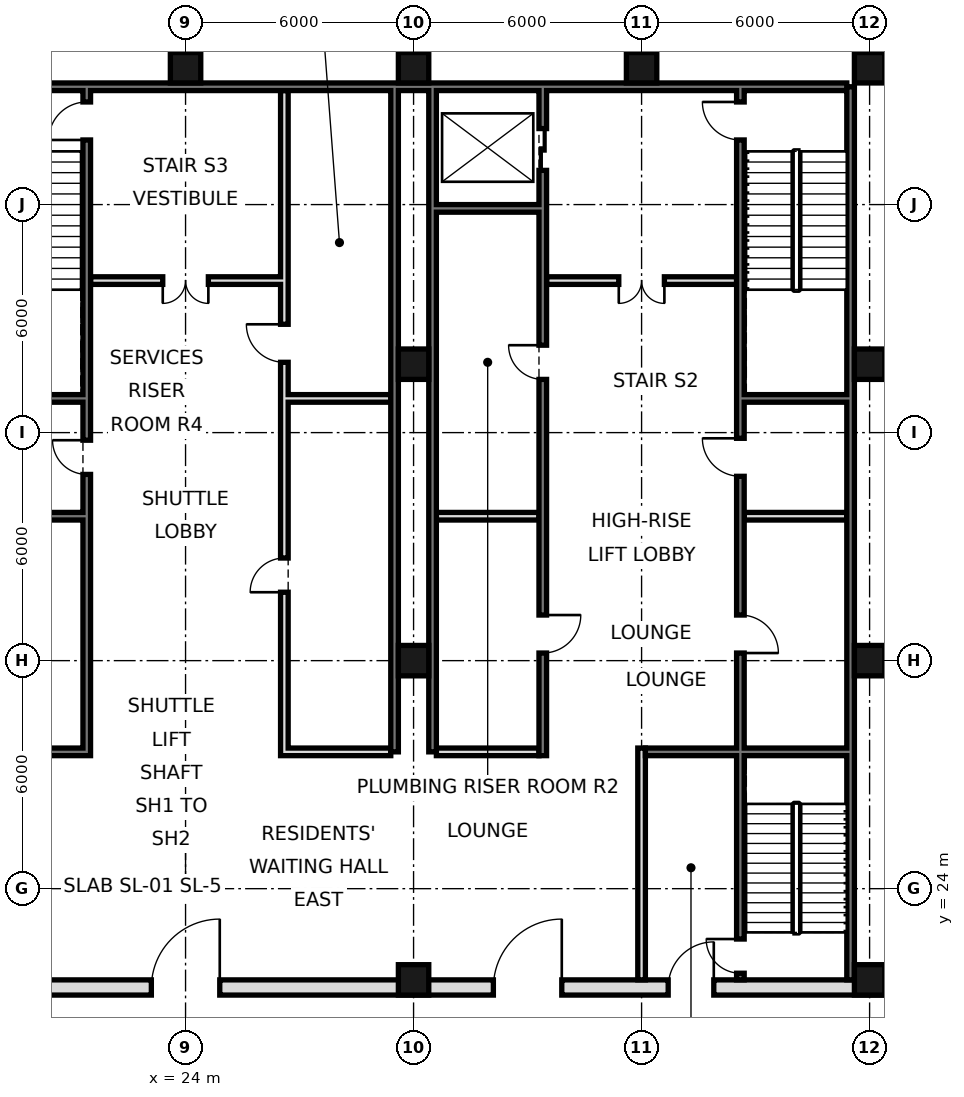
"""IFC4 building model, lengths in metres.
Left out: names, types, materials, properties, quantities, classifications, styles, units other than length and angle.
Written with IfcOpenShell. Run it as: python <this file> out.ifc"""

import sys

from ifc_helpers import new_model, si_unit, direction, frame, frame_2d, origin, origin_2d, place, context, subcontext, project, spatial, rectangle, hollow_rectangle, extrude, element, fill, save


model = new_model("IFC4")
c1 = context("Model", 3, precision=1e-05, world=origin(), true_north=direction((0.0, 1.0)))
c2 = subcontext(c1, "Body", "Model", "MODEL_VIEW")
j1 = project(units=[si_unit("LENGTHUNIT", "METRE"), si_unit("PLANEANGLEUNIT", "RADIAN")], contexts=[c1])
p1 = place(None, origin())
s1 = spatial("IfcSite", under=j1, at=p1, CompositionType="ELEMENT")
p2 = place(p1, origin())
s2 = spatial("IfcBuilding", under=s1, at=p2, CompositionType="ELEMENT")
p3 = place(p2, frame((0.0, 0.0, 25.2)))
s3 = spatial("IfcBuildingStorey", under=s2, at=p3, CompositionType="ELEMENT", Elevation=25.2)
for number, where, z_axis, x_axis in (
    (1, (24.0, 45.6, 0.0), (0.0, 0.0, 1.0), (1.0, 0.0, 0.0)),
    (2, (30.0, 21.6, 0.0), (0.0, 0.0, 1.0), (1.0, 0.0, 0.0)),
    (3, (30.0, 30.0, 0.0), (0.0, 0.0, 1.0), (1.0, 0.0, 0.0)),
    (4, (30.0, 37.8, 0.0), (0.0, 0.0, 1.0), (1.0, 0.0, 0.0)),
    (5, (30.0, 45.6, 0.0), (0.0, 0.0, 1.0), (1.0, 0.0, 0.0)),
    (6, (36.0, 45.6, 0.0), (0.0, 0.0, 1.0), (1.0, 0.0, 0.0)),
    (7, (42.0, 21.6, 0.0), (0.0, 0.0, 1.0), (1.0, 0.0, 0.0)),
    (8, (42.0, 30.0, 0.0), (0.0, 0.0, 1.0), (1.0, 0.0, 0.0)),
    (9, (42.0, 37.8, 0.0), (0.0, 0.0, 1.0), (1.0, 0.0, 0.0)),
    (10, (42.0, 45.6, 0.0), (0.0, 0.0, 1.0), (1.0, 0.0, 0.0)),
):
    element("IfcColumn", number, at=place(p3, frame(where, z_axis=z_axis, x_axis=x_axis)), inside=s3, PredefinedType="COLUMN", context=c2, shape_type="SweptSolid", body=[
        extrude(hollow_rectangle(XDim=0.8, YDim=0.8, WallThickness=0.07, at=origin_2d()), origin(), (0.0, 0.0, 1.0), 4.8),
    ])
p4 = place(p3, frame((41.5, 21.6, 0.0), z_axis=(0.0, 0.0, 1.0), x_axis=(0.0, 1.0, 0.0)))
e11 = element("IfcWall", 11, at=p4, inside=s3, PredefinedType="SOLIDWALL", context=c2, shape_type="SweptSolid", body=[
    extrude(rectangle(XDim=23.5, YDim=0.2, at=frame_2d((11.75, 0.0))), origin(), (0.0, 0.0, 1.0), 4.4),
])
p5 = place(p3, frame((6.6, 45.1, 0.0), z_axis=(0.0, 0.0, 1.0), x_axis=(1.0, 0.0, 0.0)))
e12 = element("IfcWall", 12, at=p5, inside=s3, PredefinedType="SOLIDWALL", context=c2, shape_type="SweptSolid", body=[
    extrude(rectangle(XDim=34.8, YDim=0.2, at=frame_2d((17.4, 0.0))), origin(), (0.0, 0.0, 1.0), 4.4),
])
for number, where, z_axis, x_axis in (
    (13, (29.5, 27.6, 0.0), (0.0, 0.0, 1.0), (0.0, 1.0, 0.0)),
    (14, (30.5, 27.6, 0.0), (0.0, 0.0, 1.0), (0.0, 1.0, 0.0)),
):
    element("IfcWall", number, at=place(p3, frame(where, z_axis=z_axis, x_axis=x_axis)), inside=s3, PredefinedType="SOLIDWALL", context=c2, shape_type="SweptSolid", body=[
        extrude(rectangle(XDim=17.5, YDim=0.2, at=frame_2d((8.75, 0.0))), origin(), (0.0, 0.0, 1.0), 4.4),
    ])
p6 = place(p3, frame((5.6, 21.4, 0.0), z_axis=(0.0, 0.0, 1.0), x_axis=(1.0, 0.0, 0.0)))
e15 = element("IfcWall", 15, at=p6, inside=s3, PredefinedType="SOLIDWALL", context=c2, shape_type="SweptSolid", body=[
    extrude(rectangle(XDim=36.8, YDim=0.4, at=frame_2d((18.4, 0.0))), origin(), (0.0, 0.0, 1.0), 4.4),
])
p7 = place(p6, frame((8.5, 0.0, 0.0)))
e16 = element("IfcOpeningElement", 16, at=p7, cuts=e15, PredefinedType="OPENING", context=c2, shape_type="SweptSolid", body=[
    extrude(rectangle(XDim=1.8, YDim=2.1, at=frame_2d((0.9, 1.05))), frame((0.0, 0.21, 0.0), z_axis=(0.0, -1.0, 0.0), x_axis=(1.0, 0.0, 0.0)), (0.0, 0.0, 1.0), 0.42),
])
p8 = place(p6, frame((17.5, 0.0, 0.0)))
e17 = element("IfcOpeningElement", 17, at=p8, cuts=e15, PredefinedType="OPENING", context=c2, shape_type="SweptSolid", body=[
    extrude(rectangle(XDim=1.8, YDim=2.1, at=frame_2d((0.9, 1.05))), frame((0.0, 0.21, 0.0), z_axis=(0.0, -1.0, 0.0), x_axis=(1.0, 0.0, 0.0)), (0.0, 0.0, 1.0), 0.42),
])
p9 = place(p6, frame((26.5, 0.0, 0.0)))
e18 = element("IfcOpeningElement", 18, at=p9, cuts=e15, PredefinedType="OPENING", context=c2, shape_type="SweptSolid", body=[
    extrude(rectangle(XDim=1.8, YDim=2.1, at=frame_2d((0.9, 1.05))), frame((0.0, 0.21, 0.0), z_axis=(0.0, -1.0, 0.0), x_axis=(1.0, 0.0, 0.0)), (0.0, 0.0, 1.0), 0.42),
])
p10 = place(p6, frame((4.5, 0.0, 0.0)))
e19 = element("IfcOpeningElement", 19, at=p10, cuts=e15, PredefinedType="OPENING", context=c2, shape_type="SweptSolid", body=[
    extrude(rectangle(XDim=1.2, YDim=2.1, at=frame_2d((0.6, 1.05))), frame((0.0, 0.21, 0.0), z_axis=(0.0, -1.0, 0.0), x_axis=(1.0, 0.0, 0.0)), (0.0, 0.0, 1.0), 0.42),
])
p11 = place(p6, frame((31.1, 0.0, 0.0)))
e20 = element("IfcOpeningElement", 20, at=p11, cuts=e15, PredefinedType="OPENING", context=c2, shape_type="SweptSolid", body=[
    extrude(rectangle(XDim=1.2, YDim=2.1, at=frame_2d((0.6, 1.05))), frame((0.0, 0.21, 0.0), z_axis=(0.0, -1.0, 0.0), x_axis=(1.0, 0.0, 0.0)), (0.0, 0.0, 1.0), 0.42),
])
p12 = place(p3, frame((21.4, 27.5, 0.0), z_axis=(0.0, 0.0, 1.0), x_axis=(0.0, 1.0, 0.0)))
e21 = element("IfcWall", 21, at=p12, inside=s3, PredefinedType="SOLIDWALL", context=c2, shape_type="SweptSolid", body=[
    extrude(rectangle(XDim=17.5, YDim=0.2, at=frame_2d((8.75, 0.0))), origin(), (0.0, 0.0, 1.0), 4.4),
])
p13 = place(p12, frame((16.2, 0.0, 0.0)))
e22 = element("IfcOpeningElement", 22, at=p13, cuts=e21, PredefinedType="OPENING", context=c2, shape_type="SweptSolid", body=[
    extrude(rectangle(XDim=1.0, YDim=2.1, at=frame_2d((0.5, 1.05))), frame((0.0, 0.11, 0.0), z_axis=(0.0, -1.0, 0.0), x_axis=(1.0, 0.0, 0.0)), (0.0, 0.0, 1.0), 0.22),
])
p14 = place(p12, frame((7.4, 0.0, 0.0)))
e23 = element("IfcOpeningElement", 23, at=p14, cuts=e21, PredefinedType="OPENING", context=c2, shape_type="SweptSolid", body=[
    extrude(rectangle(XDim=0.9, YDim=2.1, at=frame_2d((0.45, 1.05))), frame((0.0, 0.11, 0.0), z_axis=(0.0, -1.0, 0.0), x_axis=(1.0, 0.0, 0.0)), (0.0, 0.0, 1.0), 0.22),
])
p15 = place(p3, frame((26.6, 27.5, 0.0), z_axis=(0.0, 0.0, 1.0), x_axis=(0.0, 1.0, 0.0)))
e24 = element("IfcWall", 24, at=p15, inside=s3, PredefinedType="SOLIDWALL", context=c2, shape_type="SweptSolid", body=[
    extrude(rectangle(XDim=17.5, YDim=0.2, at=frame_2d((8.75, 0.0))), origin(), (0.0, 0.0, 1.0), 4.4),
])
p16 = place(p15, frame((4.3, 0.0, 0.0)))
e25 = element("IfcOpeningElement", 25, at=p16, cuts=e24, PredefinedType="OPENING", context=c2, shape_type="SweptSolid", body=[
    extrude(rectangle(XDim=0.9, YDim=2.1, at=frame_2d((0.45, 1.05))), frame((0.0, 0.11, 0.0), z_axis=(0.0, -1.0, 0.0), x_axis=(1.0, 0.0, 0.0)), (0.0, 0.0, 1.0), 0.22),
])
p17 = place(p15, frame((10.35, 0.0, 0.0)))
e26 = element("IfcOpeningElement", 26, at=p17, cuts=e24, PredefinedType="OPENING", context=c2, shape_type="SweptSolid", body=[
    extrude(rectangle(XDim=1.0, YDim=2.1, at=frame_2d((0.5, 1.05))), frame((0.0, 0.11, 0.0), z_axis=(0.0, -1.0, 0.0), x_axis=(1.0, 0.0, 0.0)), (0.0, 0.0, 1.0), 0.22),
])
p18 = place(p3, frame((33.4, 27.5, 0.0), z_axis=(0.0, 0.0, 1.0), x_axis=(0.0, 1.0, 0.0)))
e27 = element("IfcWall", 27, at=p18, inside=s3, PredefinedType="SOLIDWALL", context=c2, shape_type="SweptSolid", body=[
    extrude(rectangle(XDim=17.5, YDim=0.2, at=frame_2d((8.75, 0.0))), origin(), (0.0, 0.0, 1.0), 4.4),
])
p19 = place(p18, frame((15.4, 0.0, 0.0)))
e28 = element("IfcOpeningElement", 28, at=p19, cuts=e27, PredefinedType="OPENING", context=c2, shape_type="SweptSolid", body=[
    extrude(rectangle(XDim=1.1, YDim=2.1, at=frame_2d((0.55, 1.05))), frame((0.0, 0.11, 0.0), z_axis=(0.0, -1.0, 0.0), x_axis=(1.0, 0.0, 0.0)), (0.0, 0.0, 1.0), 0.22),
])
p20 = place(p18, frame((2.7, 0.0, 0.0)))
e29 = element("IfcOpeningElement", 29, at=p20, cuts=e27, PredefinedType="OPENING", context=c2, shape_type="SweptSolid", body=[
    extrude(rectangle(XDim=1.0, YDim=2.1, at=frame_2d((0.5, 1.05))), frame((0.0, 0.11, 0.0), z_axis=(0.0, -1.0, 0.0), x_axis=(1.0, 0.0, 0.0)), (0.0, 0.0, 1.0), 0.22),
])
p21 = place(p18, frame((9.9, 0.0, 0.0)))
e30 = element("IfcOpeningElement", 30, at=p21, cuts=e27, PredefinedType="OPENING", context=c2, shape_type="SweptSolid", body=[
    extrude(rectangle(XDim=0.9, YDim=2.1, at=frame_2d((0.45, 1.05))), frame((0.0, 0.11, 0.0), z_axis=(0.0, -1.0, 0.0), x_axis=(1.0, 0.0, 0.0)), (0.0, 0.0, 1.0), 0.22),
])
p22 = place(p3, frame((36.0, 21.6, 0.0), z_axis=(0.0, 0.0, 1.0), x_axis=(0.0, 1.0, 0.0)))
e31 = element("IfcWall", 31, at=p22, inside=s3, PredefinedType="PARTITIONING", context=c2, shape_type="SweptSolid", body=[
    extrude(rectangle(XDim=6.1, YDim=0.2, at=frame_2d((3.05, 0.0))), origin(), (0.0, 0.0, 1.0), 4.4),
])
p23 = place(p3, frame((38.6, 21.6, 0.0), z_axis=(0.0, 0.0, 1.0), x_axis=(0.0, 1.0, 0.0)))
e32 = element("IfcWall", 32, at=p23, inside=s3, PredefinedType="SOLIDWALL", context=c2, shape_type="SweptSolid", body=[
    extrude(rectangle(XDim=23.4, YDim=0.2, at=frame_2d((11.7, 0.0))), origin(), (0.0, 0.0, 1.0), 4.4),
])
p24 = place(p23, frame((8.6, 0.0, 0.0)))
e33 = element("IfcOpeningElement", 33, at=p24, cuts=e32, PredefinedType="OPENING", context=c2, shape_type="SweptSolid", body=[
    extrude(rectangle(XDim=1.0, YDim=2.1, at=frame_2d((0.5, 1.05))), frame((0.0, 0.11, 0.0), z_axis=(0.0, -1.0, 0.0), x_axis=(1.0, 0.0, 0.0)), (0.0, 0.0, 1.0), 0.22),
])
p25 = place(p23, frame((13.25, 0.0, 0.0)))
e34 = element("IfcOpeningElement", 34, at=p25, cuts=e32, PredefinedType="OPENING", context=c2, shape_type="SweptSolid", body=[
    extrude(rectangle(XDim=1.0, YDim=2.1, at=frame_2d((0.5, 1.05))), frame((0.0, 0.11, 0.0), z_axis=(0.0, -1.0, 0.0), x_axis=(1.0, 0.0, 0.0)), (0.0, 0.0, 1.0), 0.22),
])
p26 = place(p23, frame((22.1, 0.0, 0.0)))
e35 = element("IfcOpeningElement", 35, at=p26, cuts=e32, PredefinedType="OPENING", context=c2, shape_type="SweptSolid", body=[
    extrude(rectangle(XDim=1.0, YDim=2.1, at=frame_2d((0.5, 1.05))), frame((0.0, 0.11, 0.0), z_axis=(0.0, -1.0, 0.0), x_axis=(1.0, 0.0, 0.0)), (0.0, 0.0, 1.0), 0.22),
])
p27 = place(p23, frame((0.175, 0.0, 0.0)))
e36 = element("IfcOpeningElement", 36, at=p27, cuts=e32, PredefinedType="OPENING", context=c2, shape_type="SweptSolid", body=[
    extrude(rectangle(XDim=0.9, YDim=2.1, at=frame_2d((0.45, 1.05))), frame((0.0, 0.11, 0.0), z_axis=(0.0, -1.0, 0.0), x_axis=(1.0, 0.0, 0.0)), (0.0, 0.0, 1.0), 0.22),
])
for number, where, z_axis, x_axis in (
    (37, (18.6, 27.6, 0.0), (0.0, 0.0, 1.0), (1.0, 0.0, 0.0)),
    (38, (26.7, 27.6, 0.0), (0.0, 0.0, 1.0), (1.0, 0.0, 0.0)),
):
    element("IfcWall", number, at=place(p3, frame(where, z_axis=z_axis, x_axis=x_axis)), inside=s3, PredefinedType="SOLIDWALL", context=c2, shape_type="SweptSolid", body=[
        extrude(rectangle(XDim=2.7, YDim=0.2, at=frame_2d((1.35, 0.0))), origin(), (0.0, 0.0, 1.0), 4.4),
    ])
p28 = place(p3, frame((30.6, 27.6, 0.0), z_axis=(0.0, 0.0, 1.0), x_axis=(1.0, 0.0, 0.0)))
e39 = element("IfcWall", 39, at=p28, inside=s3, PredefinedType="PARTITIONING", context=c2, shape_type="SweptSolid", body=[
    extrude(rectangle(XDim=2.7, YDim=0.2, at=frame_2d((1.35, 0.0))), origin(), (0.0, 0.0, 1.0), 4.4),
])
p29 = place(p3, frame((36.1, 27.6, 0.0), z_axis=(0.0, 0.0, 1.0), x_axis=(1.0, 0.0, 0.0)))
e40 = element("IfcWall", 40, at=p29, inside=s3, PredefinedType="SOLIDWALL", context=c2, shape_type="SweptSolid", body=[
    extrude(rectangle(XDim=5.3, YDim=0.2, at=frame_2d((2.65, 0.0))), origin(), (0.0, 0.0, 1.0), 4.4),
])
for number, where, z_axis, x_axis in (
    (41, (18.6, 33.8, 0.0), (0.0, 0.0, 1.0), (1.0, 0.0, 0.0)),
    (42, (30.6, 33.8, 0.0), (0.0, 0.0, 1.0), (1.0, 0.0, 0.0)),
):
    element("IfcWall", number, at=place(p3, frame(where, z_axis=z_axis, x_axis=x_axis)), inside=s3, PredefinedType="SOLIDWALL", context=c2, shape_type="SweptSolid", body=[
        extrude(rectangle(XDim=2.7, YDim=0.2, at=frame_2d((1.35, 0.0))), origin(), (0.0, 0.0, 1.0), 4.4),
    ])
p30 = place(p3, frame((38.7, 33.8, 0.0), z_axis=(0.0, 0.0, 1.0), x_axis=(1.0, 0.0, 0.0)))
e43 = element("IfcWall", 43, at=p30, inside=s3, PredefinedType="PARTITIONING", context=c2, shape_type="SweptSolid", body=[
    extrude(rectangle(XDim=2.7, YDim=0.2, at=frame_2d((1.35, 0.0))), origin(), (0.0, 0.0, 1.0), 4.4),
])
for number, where, z_axis, x_axis in (
    (44, (18.6, 36.9, 0.0), (0.0, 0.0, 1.0), (1.0, 0.0, 0.0)),
    (45, (26.7, 36.9, 0.0), (0.0, 0.0, 1.0), (1.0, 0.0, 0.0)),
    (46, (38.7, 36.9, 0.0), (0.0, 0.0, 1.0), (1.0, 0.0, 0.0)),
):
    element("IfcWall", number, at=place(p3, frame(where, z_axis=z_axis, x_axis=x_axis)), inside=s3, PredefinedType="SOLIDWALL", context=c2, shape_type="SweptSolid", body=[
        extrude(rectangle(XDim=2.7, YDim=0.2, at=frame_2d((1.35, 0.0))), origin(), (0.0, 0.0, 1.0), 4.4),
    ])
p31 = place(p3, frame((21.5, 40.0, 0.0), z_axis=(0.0, 0.0, 1.0), x_axis=(1.0, 0.0, 0.0)))
e47 = element("IfcWall", 47, at=p31, inside=s3, PredefinedType="PARTITIONING", context=c2, shape_type="SweptSolid", body=[
    extrude(rectangle(XDim=5.0, YDim=0.2, at=frame_2d((2.5, 0.0))), origin(), (0.0, 0.0, 1.0), 4.4),
])
p32 = place(p31, frame((1.9, 0.0, 0.0)))
e48 = element("IfcOpeningElement", 48, at=p32, cuts=e47, PredefinedType="OPENING", context=c2, shape_type="SweptSolid", body=[
    extrude(rectangle(XDim=1.2, YDim=2.1, at=frame_2d((0.6, 1.05))), frame((0.0, 0.11, 0.0), z_axis=(0.0, -1.0, 0.0), x_axis=(1.0, 0.0, 0.0)), (0.0, 0.0, 1.0), 0.22),
])
p33 = place(p3, frame((33.5, 40.0, 0.0), z_axis=(0.0, 0.0, 1.0), x_axis=(1.0, 0.0, 0.0)))
e49 = element("IfcWall", 49, at=p33, inside=s3, PredefinedType="PARTITIONING", context=c2, shape_type="SweptSolid", body=[
    extrude(rectangle(XDim=5.0, YDim=0.2, at=frame_2d((2.5, 0.0))), origin(), (0.0, 0.0, 1.0), 4.4),
])
p34 = place(p33, frame((1.9, 0.0, 0.0)))
e50 = element("IfcOpeningElement", 50, at=p34, cuts=e49, PredefinedType="OPENING", context=c2, shape_type="SweptSolid", body=[
    extrude(rectangle(XDim=1.2, YDim=2.1, at=frame_2d((0.6, 1.05))), frame((0.0, 0.11, 0.0), z_axis=(0.0, -1.0, 0.0), x_axis=(1.0, 0.0, 0.0)), (0.0, 0.0, 1.0), 0.22),
])
p35 = place(p3, frame((30.6, 41.9, 0.0), z_axis=(0.0, 0.0, 1.0), x_axis=(1.0, 0.0, 0.0)))
e51 = element("IfcWall", 51, at=p35, inside=s3, PredefinedType="SOLIDWALL", context=c2, shape_type="SweptSolid", body=[
    extrude(rectangle(XDim=2.7, YDim=0.2, at=frame_2d((1.35, 0.0))), origin(), (0.0, 0.0, 1.0), 4.4),
])
p36 = place(p8, frame((1.8, 0.0, 0.0), z_axis=(0.0, 0.0, 1.0), x_axis=(-1.0, 0.0, 0.0)))
e52 = element("IfcDoor", 52, at=p36, inside=s3, OperationType="SINGLE_SWING_LEFT", PredefinedType="DOOR", context=c2, shape_type="SweptSolid", body=[
    extrude(rectangle(XDim=1.8, YDim=2.1, at=frame_2d((0.9, 1.05))), frame((0.0, 0.025, 0.0), z_axis=(0.0, -1.0, 0.0), x_axis=(1.0, 0.0, 0.0)), (0.0, 0.0, 1.0), 0.05),
])
fill(e17, e52)
p37 = place(p9, frame((1.8, 0.0, 0.0), z_axis=(0.0, 0.0, 1.0), x_axis=(-1.0, 0.0, 0.0)))
e53 = element("IfcDoor", 53, at=p37, inside=s3, OperationType="SINGLE_SWING_LEFT", PredefinedType="DOOR", context=c2, shape_type="SweptSolid", body=[
    extrude(rectangle(XDim=1.8, YDim=2.1, at=frame_2d((0.9, 1.05))), frame((0.0, 0.025, 0.0), z_axis=(0.0, -1.0, 0.0), x_axis=(1.0, 0.0, 0.0)), (0.0, 0.0, 1.0), 0.05),
])
fill(e18, e53)
p38 = place(p11, frame((1.2, 0.0, 0.0), z_axis=(0.0, 0.0, 1.0), x_axis=(-1.0, 0.0, 0.0)))
e54 = element("IfcDoor", 54, at=p38, inside=s3, OperationType="SINGLE_SWING_LEFT", PredefinedType="DOOR", context=c2, shape_type="SweptSolid", body=[
    extrude(rectangle(XDim=1.2, YDim=2.1, at=frame_2d((0.6, 1.05))), frame((0.0, 0.025, 0.0), z_axis=(0.0, -1.0, 0.0), x_axis=(1.0, 0.0, 0.0)), (0.0, 0.0, 1.0), 0.05),
])
fill(e20, e54)
p39 = place(p32, frame((1.2, 0.0, 0.0), z_axis=(0.0, 0.0, 1.0), x_axis=(-1.0, 0.0, 0.0)))
e55 = element("IfcDoor", 55, at=p39, inside=s3, OperationType="DOUBLE_DOOR_SINGLE_SWING", PredefinedType="DOOR", context=c2, shape_type="SweptSolid", body=[
    extrude(rectangle(XDim=1.2, YDim=2.1, at=frame_2d((0.6, 1.05))), frame((0.0, 0.025, 0.0), z_axis=(0.0, -1.0, 0.0), x_axis=(1.0, 0.0, 0.0)), (0.0, 0.0, 1.0), 0.05),
])
fill(e48, e55)
p40 = place(p34, frame((1.2, 0.0, 0.0), z_axis=(0.0, 0.0, 1.0), x_axis=(-1.0, 0.0, 0.0)))
e56 = element("IfcDoor", 56, at=p40, inside=s3, OperationType="DOUBLE_DOOR_SINGLE_SWING", PredefinedType="DOOR", context=c2, shape_type="SweptSolid", body=[
    extrude(rectangle(XDim=1.2, YDim=2.1, at=frame_2d((0.6, 1.05))), frame((0.0, 0.025, 0.0), z_axis=(0.0, -1.0, 0.0), x_axis=(1.0, 0.0, 0.0)), (0.0, 0.0, 1.0), 0.05),
])
fill(e50, e56)
p41 = place(p19, origin())
e57 = element("IfcDoor", 57, at=p41, inside=s3, OperationType="DOUBLE_DOOR_SLIDING", PredefinedType="DOOR", context=c2, shape_type="SweptSolid", body=[
    extrude(rectangle(XDim=1.1, YDim=2.1, at=frame_2d((0.55, 1.05))), frame((0.0, 0.025, 0.0), z_axis=(0.0, -1.0, 0.0), x_axis=(1.0, 0.0, 0.0)), (0.0, 0.0, 1.0), 0.05),
])
fill(e28, e57)
p42 = place(p24, frame((1.0, 0.0, 0.0), z_axis=(0.0, 0.0, 1.0), x_axis=(-1.0, 0.0, 0.0)))
e58 = element("IfcDoor", 58, at=p42, inside=s3, OperationType="SINGLE_SWING_RIGHT", PredefinedType="DOOR", context=c2, shape_type="SweptSolid", body=[
    extrude(rectangle(XDim=1.0, YDim=2.1, at=frame_2d((0.5, 1.05))), frame((0.0, 0.025, 0.0), z_axis=(0.0, -1.0, 0.0), x_axis=(1.0, 0.0, 0.0)), (0.0, 0.0, 1.0), 0.05),
])
fill(e33, e58)
p43 = place(p25, frame((1.0, 0.0, 0.0), z_axis=(0.0, 0.0, 1.0), x_axis=(-1.0, 0.0, 0.0)))
e59 = element("IfcDoor", 59, at=p43, inside=s3, OperationType="SINGLE_SWING_LEFT", PredefinedType="DOOR", context=c2, shape_type="SweptSolid", body=[
    extrude(rectangle(XDim=1.0, YDim=2.1, at=frame_2d((0.5, 1.05))), frame((0.0, 0.025, 0.0), z_axis=(0.0, -1.0, 0.0), x_axis=(1.0, 0.0, 0.0)), (0.0, 0.0, 1.0), 0.05),
])
fill(e34, e59)
p44 = place(p20, origin())
e60 = element("IfcDoor", 60, at=p44, inside=s3, OperationType="SINGLE_SWING_RIGHT", PredefinedType="DOOR", context=c2, shape_type="SweptSolid", body=[
    extrude(rectangle(XDim=1.0, YDim=2.1, at=frame_2d((0.5, 1.05))), frame((0.0, 0.025, 0.0), z_axis=(0.0, -1.0, 0.0), x_axis=(1.0, 0.0, 0.0)), (0.0, 0.0, 1.0), 0.05),
])
fill(e29, e60)
p45 = place(p26, frame((1.0, 0.0, 0.0), z_axis=(0.0, 0.0, 1.0), x_axis=(-1.0, 0.0, 0.0)))
e61 = element("IfcDoor", 61, at=p45, inside=s3, OperationType="SINGLE_SWING_LEFT", PredefinedType="DOOR", context=c2, shape_type="SweptSolid", body=[
    extrude(rectangle(XDim=1.0, YDim=2.1, at=frame_2d((0.5, 1.05))), frame((0.0, 0.025, 0.0), z_axis=(0.0, -1.0, 0.0), x_axis=(1.0, 0.0, 0.0)), (0.0, 0.0, 1.0), 0.05),
])
fill(e35, e61)
p46 = place(p13, origin())
e62 = element("IfcDoor", 62, at=p46, inside=s3, OperationType="SINGLE_SWING_LEFT", PredefinedType="DOOR", context=c2, shape_type="SweptSolid", body=[
    extrude(rectangle(XDim=1.0, YDim=2.1, at=frame_2d((0.5, 1.05))), frame((0.0, 0.025, 0.0), z_axis=(0.0, -1.0, 0.0), x_axis=(1.0, 0.0, 0.0)), (0.0, 0.0, 1.0), 0.05),
])
fill(e22, e62)
p47 = place(p27, frame((0.9, 0.0, 0.0), z_axis=(0.0, 0.0, 1.0), x_axis=(-1.0, 0.0, 0.0)))
e63 = element("IfcDoor", 63, at=p47, inside=s3, OperationType="SINGLE_SWING_LEFT", PredefinedType="DOOR", context=c2, shape_type="SweptSolid", body=[
    extrude(rectangle(XDim=0.9, YDim=2.1, at=frame_2d((0.45, 1.05))), frame((0.0, 0.025, 0.0), z_axis=(0.0, -1.0, 0.0), x_axis=(1.0, 0.0, 0.0)), (0.0, 0.0, 1.0), 0.05),
])
fill(e36, e63)
p48 = place(p21, frame((0.9, 0.0, 0.0), z_axis=(0.0, 0.0, 1.0), x_axis=(-1.0, 0.0, 0.0)))
e64 = element("IfcDoor", 64, at=p48, inside=s3, OperationType="SINGLE_SWING_LEFT", PredefinedType="DOOR", context=c2, shape_type="SweptSolid", body=[
    extrude(rectangle(XDim=0.9, YDim=2.1, at=frame_2d((0.45, 1.05))), frame((0.0, 0.025, 0.0), z_axis=(0.0, -1.0, 0.0), x_axis=(1.0, 0.0, 0.0)), (0.0, 0.0, 1.0), 0.05),
])
fill(e30, e64)
p49 = place(p14, frame((0.9, 0.0, 0.0), z_axis=(0.0, 0.0, 1.0), x_axis=(-1.0, 0.0, 0.0)))
e65 = element("IfcDoor", 65, at=p49, inside=s3, OperationType="SINGLE_SWING_LEFT", PredefinedType="DOOR", context=c2, shape_type="SweptSolid", body=[
    extrude(rectangle(XDim=0.9, YDim=2.1, at=frame_2d((0.45, 1.05))), frame((0.0, 0.025, 0.0), z_axis=(0.0, -1.0, 0.0), x_axis=(1.0, 0.0, 0.0)), (0.0, 0.0, 1.0), 0.05),
])
fill(e23, e65)
p50 = place(p16, origin())
e66 = element("IfcDoor", 66, at=p50, inside=s3, OperationType="SINGLE_SWING_LEFT", PredefinedType="DOOR", context=c2, shape_type="SweptSolid", body=[
    extrude(rectangle(XDim=0.9, YDim=2.1, at=frame_2d((0.45, 1.05))), frame((0.0, 0.025, 0.0), z_axis=(0.0, -1.0, 0.0), x_axis=(1.0, 0.0, 0.0)), (0.0, 0.0, 1.0), 0.05),
])
fill(e25, e66)
p51 = place(p17, frame((1.0, 0.0, 0.0), z_axis=(0.0, 0.0, 1.0), x_axis=(-1.0, 0.0, 0.0)))
e67 = element("IfcDoor", 67, at=p51, inside=s3, OperationType="SINGLE_SWING_LEFT", PredefinedType="DOOR", context=c2, shape_type="SweptSolid", body=[
    extrude(rectangle(XDim=1.0, YDim=2.1, at=frame_2d((0.5, 1.05))), frame((0.0, 0.025, 0.0), z_axis=(0.0, -1.0, 0.0), x_axis=(1.0, 0.0, 0.0)), (0.0, 0.0, 1.0), 0.05),
])
fill(e26, e67)
save(model, sys.argv[1])
